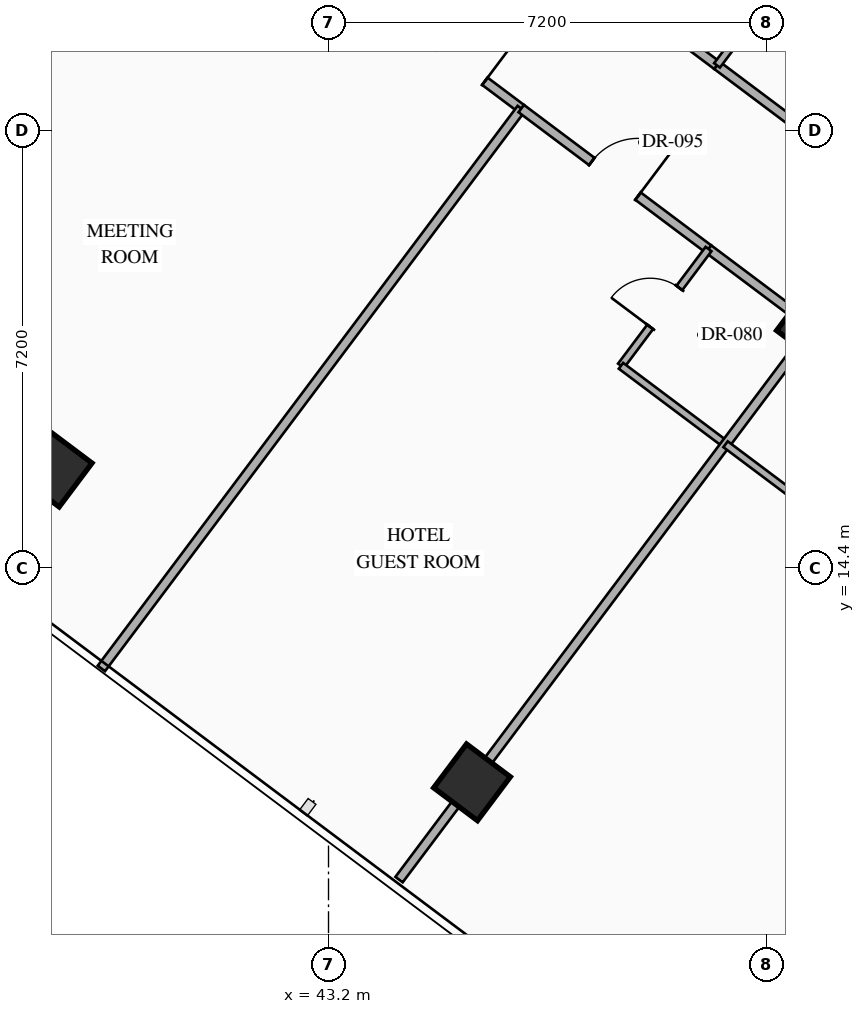
"""IFC4 building model, lengths in metres.
Left out: names, types, materials, properties, quantities, classifications, styles, units other than length and angle.
Written with IfcOpenShell. Run it as: python <this file> out.ifc"""

import sys

from ifc_helpers import new_model, si_unit, direction, frame, frame_2d, origin, origin_2d, place, context, subcontext, project, spatial, rectangle, hollow_rectangle, extrude, element, fill, save


model = new_model("IFC4")
c1 = context("Model", 3, precision=1e-05, world=origin(), true_north=direction((0.0, 1.0)))
c2 = subcontext(c1, "Body", "Model", "MODEL_VIEW")
j1 = project(units=[si_unit("LENGTHUNIT", "METRE"), si_unit("PLANEANGLEUNIT", "RADIAN")], contexts=[c1])
p1 = place(None, origin())
s1 = spatial("IfcSite", under=j1, at=p1, CompositionType="ELEMENT")
p2 = place(p1, origin())
s2 = spatial("IfcBuilding", under=s1, at=p2, CompositionType="ELEMENT")
p3 = place(p2, frame((0.0, 0.0, 84.65)))
s3 = spatial("IfcBuildingStorey", under=s2, at=p3, CompositionType="ELEMENT", Elevation=84.65)
for number, where, z_axis, x_axis in (
    (1, (38.68, 16.04, 0.0), (0.0, 0.0, 1.0), (0.8, -0.6, 0.0)),
    (2, (45.56, 10.88, 0.0), (0.0, 0.0, 1.0), (0.8, -0.6, 0.0)),
    (3, (51.2, 18.4, 0.0), (0.0, 0.0, 1.0), (0.8, -0.6, 0.0)),
):
    element("IfcColumn", number, at=place(p3, frame(where, z_axis=z_axis, x_axis=x_axis)), inside=s3, PredefinedType="COLUMN", context=c2, shape_type="SweptSolid", body=[
        extrude(hollow_rectangle(XDim=0.9, YDim=0.9, WallThickness=0.036, at=origin_2d()), origin(), (0.0, 0.0, 1.0), 3.35),
    ])
p4 = place(p3, frame((44.86, 40.73, 0.0), z_axis=(0.0, 0.0, 1.0), x_axis=(0.800006902154, -0.599990797017, 0.0)))
e4 = element("IfcWall", 4, at=p4, inside=s3, PredefinedType="STANDARD", context=c2, shape_type="SweptSolid", body=[
    extrude(rectangle(XDim=29.712, YDim=0.28, at=frame_2d((14.856, 0.0))), origin(), (0.0, 0.0, 1.0), 3.13),
])
p5 = place(p4, frame((14.249, 0.0, 0.0)))
e5 = element("IfcOpeningElement", 5, at=p5, cuts=e4, PredefinedType="OPENING", context=c2, shape_type="SweptSolid", body=[
    extrude(rectangle(XDim=1.1, YDim=2.2, at=frame_2d((0.55, 1.1))), frame((0.0, 0.15, 0.0), z_axis=(0.0, -1.0, 0.0), x_axis=(1.0, 0.0, 0.0)), (0.0, 0.0, 1.0), 0.3),
])
p6 = place(p4, frame((1.612, 0.0, 0.85)))
e6 = element("IfcOpeningElement", 6, at=p6, cuts=e4, PredefinedType="OPENING", context=c2, shape_type="SweptSolid", body=[
    extrude(rectangle(XDim=1.4, YDim=1.8, at=frame_2d((0.7, 0.9))), frame((0.0, 0.15, 0.0), z_axis=(0.0, -1.0, 0.0), x_axis=(1.0, 0.0, 0.0)), (0.0, 0.0, 1.0), 0.3),
])
p7 = place(p4, frame((5.667, 0.0, 0.85)))
e7 = element("IfcOpeningElement", 7, at=p7, cuts=e4, PredefinedType="OPENING", context=c2, shape_type="SweptSolid", body=[
    extrude(rectangle(XDim=1.4, YDim=1.8, at=frame_2d((0.7, 0.9))), frame((0.0, 0.15, 0.0), z_axis=(0.0, -1.0, 0.0), x_axis=(1.0, 0.0, 0.0)), (0.0, 0.0, 1.0), 0.3),
])
p8 = place(p4, frame((9.912, 0.0, 0.85)))
e8 = element("IfcOpeningElement", 8, at=p8, cuts=e4, PredefinedType="OPENING", context=c2, shape_type="SweptSolid", body=[
    extrude(rectangle(XDim=1.4, YDim=1.8, at=frame_2d((0.7, 0.9))), frame((0.0, 0.15, 0.0), z_axis=(0.0, -1.0, 0.0), x_axis=(1.0, 0.0, 0.0)), (0.0, 0.0, 1.0), 0.3),
])
p9 = place(p4, frame((19.743, 0.0, 0.85)))
e9 = element("IfcOpeningElement", 9, at=p9, cuts=e4, PredefinedType="OPENING", context=c2, shape_type="SweptSolid", body=[
    extrude(rectangle(XDim=1.4, YDim=1.8, at=frame_2d((0.7, 0.9))), frame((0.0, 0.15, 0.0), z_axis=(0.0, -1.0, 0.0), x_axis=(1.0, 0.0, 0.0)), (0.0, 0.0, 1.0), 0.3),
])
p10 = place(p4, frame((22.645, 0.0, 0.85)))
e10 = element("IfcOpeningElement", 10, at=p10, cuts=e4, PredefinedType="OPENING", context=c2, shape_type="SweptSolid", body=[
    extrude(rectangle(XDim=1.4, YDim=1.8, at=frame_2d((0.7, 0.9))), frame((0.0, 0.15, 0.0), z_axis=(0.0, -1.0, 0.0), x_axis=(1.0, 0.0, 0.0)), (0.0, 0.0, 1.0), 0.3),
])
p11 = place(p4, frame((26.7, 0.0, 0.85)))
e11 = element("IfcOpeningElement", 11, at=p11, cuts=e4, PredefinedType="OPENING", context=c2, shape_type="SweptSolid", body=[
    extrude(rectangle(XDim=1.4, YDim=1.8, at=frame_2d((0.7, 0.9))), frame((0.0, 0.15, 0.0), z_axis=(0.0, -1.0, 0.0), x_axis=(1.0, 0.0, 0.0)), (0.0, 0.0, 1.0), 0.3),
])
p12 = place(p3, frame((43.037, 24.46, 0.0), z_axis=(0.0, 0.0, 1.0), x_axis=(0.799971872363, -0.600037501685, 0.0)))
e12 = element("IfcWall", 12, at=p12, inside=s3, PredefinedType="PARTITIONING", context=c2, shape_type="SweptSolid", body=[
    extrude(rectangle(XDim=4.167, YDim=0.15, at=frame_2d((2.083, 0.0))), origin(), (0.0, 0.0, 1.0), 2.425),
])
p13 = place(p12, frame((2.468, 0.0, 0.0)))
e13 = element("IfcOpeningElement", 13, at=p13, cuts=e12, PredefinedType="OPENING", context=c2, shape_type="SweptSolid", body=[
    extrude(rectangle(XDim=0.95, YDim=2.15, at=frame_2d((0.475, 1.075))), frame((0.0, 0.085, 0.0), z_axis=(0.0, -1.0, 0.0), x_axis=(1.0, 0.0, 0.0)), (0.0, 0.0, 1.0), 0.17),
])
p14 = place(p3, frame((33.384, 17.312, 0.0), z_axis=(0.0, 0.0, 1.0), x_axis=(0.600008743659, 0.799993442181, 0.0)))
e14 = element("IfcWall", 14, at=p14, inside=s3, PredefinedType="PARTITIONING", context=c2, shape_type="SweptSolid", body=[
    extrude(rectangle(XDim=8.935, YDim=0.15, at=frame_2d((4.468, 0.0))), origin(), (0.0, 0.0, 1.0), 3.13),
])
p15 = place(p3, frame((39.464, 12.752, 0.0), z_axis=(0.0, 0.0, 1.0), x_axis=(0.6, 0.8, 0.0)))
e15 = element("IfcWall", 15, at=p15, inside=s3, PredefinedType="PARTITIONING", context=c2, shape_type="SweptSolid", body=[
    extrude(rectangle(XDim=11.51, YDim=0.15, at=frame_2d((5.755, 0.0))), origin(), (0.0, 0.0, 1.0), 3.13),
])
p16 = place(p3, frame((47.87, 23.96, 0.0), z_axis=(0.0, 0.0, 1.0), x_axis=(0.79998637334, -0.60001816845, 0.0)))
e16 = element("IfcWall", 16, at=p16, inside=s3, PredefinedType="PARTITIONING", context=c2, shape_type="SweptSolid", body=[
    extrude(rectangle(XDim=2.15, YDim=0.15, at=frame_2d((1.075, 0.0))), origin(), (0.0, 0.0, 1.0), 2.775),
])
p17 = place(p3, frame((49.59, 22.67, 0.0), z_axis=(0.0, 0.0, 1.0), x_axis=(0.799993416095, -0.600008778439, 0.0)))
e17 = element("IfcWall", 17, at=p17, inside=s3, PredefinedType="PARTITIONING", context=c2, shape_type="SweptSolid", body=[
    extrude(rectangle(XDim=4.45, YDim=0.15, at=frame_2d((2.225, 0.0))), origin(), (0.0, 0.0, 1.0), 2.775),
])
p18 = place(p17, frame((1.75, 0.0, 0.0)))
e18 = element("IfcOpeningElement", 18, at=p18, cuts=e17, PredefinedType="OPENING", context=c2, shape_type="SweptSolid", body=[
    extrude(rectangle(XDim=0.95, YDim=2.15, at=frame_2d((0.475, 1.075))), frame((0.0, 0.085, 0.0), z_axis=(0.0, -1.0, 0.0), x_axis=(1.0, 0.0, 0.0)), (0.0, 0.0, 1.0), 0.17),
])
p19 = place(p3, frame((49.59, 22.67, 0.0), z_axis=(0.0, 0.0, 1.0), x_axis=(0.599951172744, 0.800036618114, 0.0)))
e19 = element("IfcWall", 19, at=p19, inside=s3, PredefinedType="PARTITIONING", context=c2, shape_type="SweptSolid", body=[
    extrude(rectangle(XDim=2.4, YDim=0.12, at=frame_2d((1.2, 0.0))), origin(), (0.0, 0.0, 1.0), 3.13),
])
p20 = place(p19, frame((0.8, 0.0, 0.0)))
e20 = element("IfcOpeningElement", 20, at=p20, cuts=e19, PredefinedType="OPENING", context=c2, shape_type="SweptSolid", body=[
    extrude(rectangle(XDim=0.8, YDim=2.06, at=frame_2d((0.4, 1.03))), frame((0.0, 0.07, 0.0), z_axis=(0.0, -1.0, 0.0), x_axis=(1.0, 0.0, 0.0)), (0.0, 0.0, 1.0), 0.14),
])
p21 = place(p3, frame((46.37, 21.96, 0.0), z_axis=(0.0, 0.0, 1.0), x_axis=(0.799977170108, -0.600030438649, 0.0)))
e21 = element("IfcWall", 21, at=p21, inside=s3, PredefinedType="PARTITIONING", context=c2, shape_type="SweptSolid", body=[
    extrude(rectangle(XDim=3.85, YDim=0.15, at=frame_2d((1.925, 0.0))), origin(), (0.0, 0.0, 1.0), 2.425),
])
p22 = place(p21, frame((1.45, 0.0, 0.0)))
e22 = element("IfcOpeningElement", 22, at=p22, cuts=e21, PredefinedType="OPENING", context=c2, shape_type="SweptSolid", body=[
    extrude(rectangle(XDim=0.95, YDim=2.15, at=frame_2d((0.475, 1.075))), frame((0.0, 0.085, 0.0), z_axis=(0.0, -1.0, 0.0), x_axis=(1.0, 0.0, 0.0)), (0.0, 0.0, 1.0), 0.17),
])
p23 = place(p3, frame((49.45, 19.65, 0.0), z_axis=(0.0, 0.0, 1.0), x_axis=(0.800040880289, -0.59994548908, 0.0)))
e23 = element("IfcWall", 23, at=p23, inside=s3, PredefinedType="PARTITIONING", context=c2, shape_type="SweptSolid", body=[
    extrude(rectangle(XDim=2.15, YDim=0.15, at=frame_2d((1.075, 0.0))), origin(), (0.0, 0.0, 1.0), 2.425),
])
p24 = place(p3, frame((48.01, 17.73, 0.0), z_axis=(0.0, 0.0, 1.0), x_axis=(0.6, 0.8, 0.0)))
e24 = element("IfcWall", 24, at=p24, inside=s3, PredefinedType="PARTITIONING", context=c2, shape_type="SweptSolid", body=[
    extrude(rectangle(XDim=2.4, YDim=0.12, at=frame_2d((1.2, 0.0))), origin(), (0.0, 0.0, 1.0), 3.13),
])
p25 = place(p24, frame((0.8, 0.0, 0.0)))
e25 = element("IfcOpeningElement", 25, at=p25, cuts=e24, PredefinedType="OPENING", context=c2, shape_type="SweptSolid", body=[
    extrude(rectangle(XDim=0.8, YDim=2.06, at=frame_2d((0.4, 1.03))), frame((0.0, 0.07, 0.0), z_axis=(0.0, -1.0, 0.0), x_axis=(1.0, 0.0, 0.0)), (0.0, 0.0, 1.0), 0.14),
])
p26 = place(p3, frame((48.01, 17.73, 0.0), z_axis=(0.0, 0.0, 1.0), x_axis=(0.79998637334, -0.60001816845, 0.0)))
e26 = element("IfcWall", 26, at=p26, inside=s3, PredefinedType="PARTITIONING", context=c2, shape_type="SweptSolid", body=[
    extrude(rectangle(XDim=2.15, YDim=0.12, at=frame_2d((1.075, 0.0))), origin(), (0.0, 0.0, 1.0), 3.13),
])
p27 = place(p3, frame((44.36, 9.28, 0.0), z_axis=(0.0, 0.0, 1.0), x_axis=(0.599986233332, 0.800010324816, 0.0)))
e27 = element("IfcWall", 27, at=p27, inside=s3, PredefinedType="PARTITIONING", context=c2, shape_type="SweptSolid", body=[
    extrude(rectangle(XDim=11.35, YDim=0.15, at=frame_2d((5.675, 0.0))), origin(), (0.0, 0.0, 1.0), 2.425),
])
p28 = place(p3, frame((49.73, 16.44, 0.0), z_axis=(0.0, 0.0, 1.0), x_axis=(0.79998637334, -0.60001816845, 0.0)))
e28 = element("IfcWall", 28, at=p28, inside=s3, PredefinedType="PARTITIONING", context=c2, shape_type="SweptSolid", body=[
    extrude(rectangle(XDim=2.15, YDim=0.12, at=frame_2d((1.075, 0.0))), origin(), (0.0, 0.0, 1.0), 3.13),
])
p29 = place(p13, origin())
e29 = element("IfcDoor", 29, at=p29, inside=s3, OperationType="SINGLE_SWING_RIGHT", PredefinedType="DOOR", context=c2, shape_type="SweptSolid", body=[
    extrude(rectangle(XDim=0.95, YDim=2.15, at=frame_2d((0.475, 1.075))), frame((0.0, 0.025, 0.0), z_axis=(0.0, -1.0, 0.0), x_axis=(1.0, 0.0, 0.0)), (0.0, 0.0, 1.0), 0.05),
])
fill(e13, e29)
p30 = place(p22, origin())
e30 = element("IfcDoor", 30, at=p30, inside=s3, OperationType="SINGLE_SWING_RIGHT", PredefinedType="DOOR", context=c2, shape_type="SweptSolid", body=[
    extrude(rectangle(XDim=0.95, YDim=2.15, at=frame_2d((0.475, 1.075))), frame((0.0, 0.025, 0.0), z_axis=(0.0, -1.0, 0.0), x_axis=(1.0, 0.0, 0.0)), (0.0, 0.0, 1.0), 0.05),
])
fill(e22, e30)
p31 = place(p25, origin())
e31 = element("IfcDoor", 31, at=p31, inside=s3, OperationType="SINGLE_SWING_LEFT", PredefinedType="DOOR", context=c2, shape_type="SweptSolid", body=[
    extrude(rectangle(XDim=0.8, YDim=2.06, at=frame_2d((0.4, 1.03))), frame((0.0, 0.025, 0.0), z_axis=(0.0, -1.0, 0.0), x_axis=(1.0, 0.0, 0.0)), (0.0, 0.0, 1.0), 0.05),
])
fill(e25, e31)
save(model, sys.argv[1])
